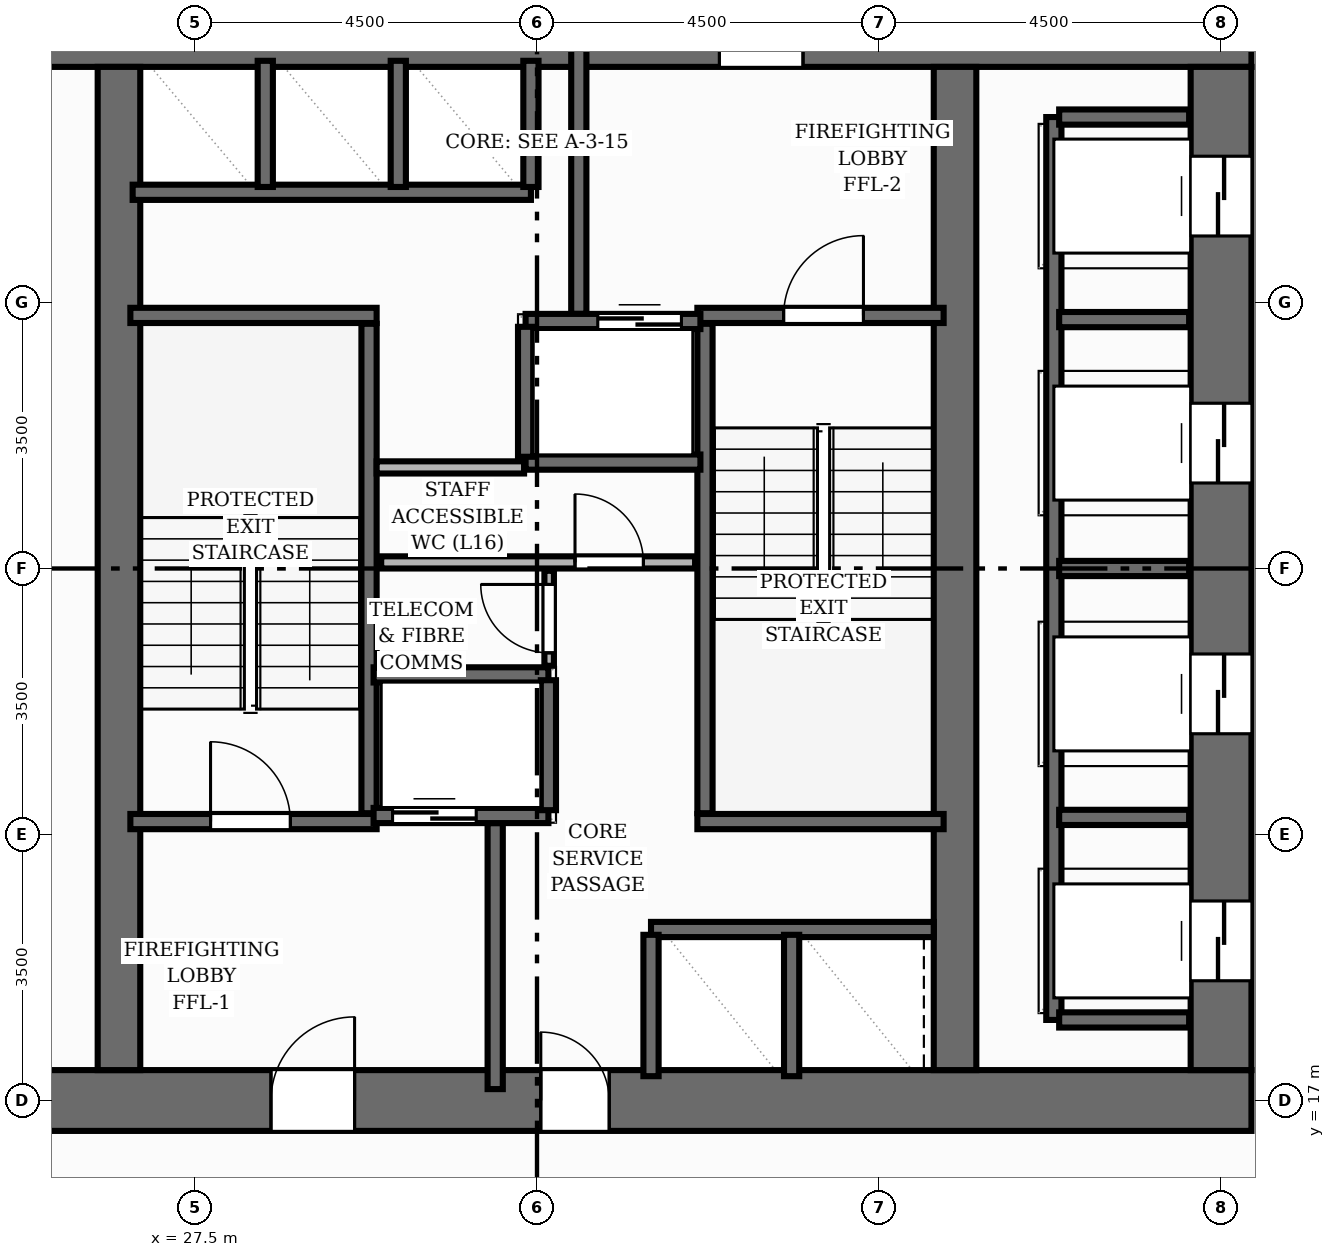
"""IFC4 building model, lengths in metres.
Left out: names, types, materials, properties, quantities, classifications, styles, units other than length and angle.
Written with IfcOpenShell. Run it as: python <this file> out.ifc"""

import sys

from ifc_helpers import new_model, si_unit, direction, frame, frame_2d, origin, place, context, subcontext, project, spatial, rectangle, extrude, element, fill, save


model = new_model("IFC4")
c1 = context("Model", 3, precision=1e-05, world=origin(), true_north=direction((0.0, 1.0)))
c2 = subcontext(c1, "Body", "Model", "MODEL_VIEW")
j1 = project(units=[si_unit("LENGTHUNIT", "METRE"), si_unit("PLANEANGLEUNIT", "RADIAN")], contexts=[c1])
p1 = place(None, origin())
s1 = spatial("IfcSite", under=j1, at=p1, CompositionType="ELEMENT")
p2 = place(p1, origin())
s2 = spatial("IfcBuilding", under=s1, at=p2, CompositionType="ELEMENT")
p3 = place(p2, frame((0.0, 0.0, 56.8)))
s3 = spatial("IfcBuildingStorey", under=s2, at=p3, CompositionType="ELEMENT", Elevation=56.8)
p4 = place(p3, frame((22.6, 17.0, 0.0), z_axis=(0.0, 0.0, 1.0), x_axis=(1.0, 0.0, 0.0)))
e1 = element("IfcWall", 1, at=p4, inside=s3, PredefinedType="SHEAR", context=c2, shape_type="SweptSolid", body=[
    extrude(rectangle(XDim=18.8, YDim=0.8, at=frame_2d((9.4, 0.0))), origin(), (0.0, 0.0, 1.0), 3.2),
])
p5 = place(p4, frame((5.9, 0.0, 0.0)))
e2 = element("IfcOpeningElement", 2, at=p5, cuts=e1, PredefinedType="OPENING", context=c2, shape_type="SweptSolid", body=[
    extrude(rectangle(XDim=1.1, YDim=2.15, at=frame_2d((0.55, 1.075))), frame((0.0, 0.41, 0.0), z_axis=(0.0, -1.0, 0.0), x_axis=(1.0, 0.0, 0.0)), (0.0, 0.0, 1.0), 0.82),
])
p6 = place(p4, frame((9.45, 0.0, 0.0)))
e3 = element("IfcOpeningElement", 3, at=p6, cuts=e1, PredefinedType="OPENING", context=c2, shape_type="SweptSolid", body=[
    extrude(rectangle(XDim=0.9, YDim=2.1, at=frame_2d((0.45, 1.05))), frame((0.0, 0.41, 0.0), z_axis=(0.0, -1.0, 0.0), x_axis=(1.0, 0.0, 0.0)), (0.0, 0.0, 1.0), 0.82),
])
p7 = place(p3, frame((22.6, 31.0, 0.0), z_axis=(0.0, 0.0, 1.0), x_axis=(1.0, 0.0, 0.0)))
e4 = element("IfcWall", 4, at=p7, inside=s3, PredefinedType="SHEAR", context=c2, shape_type="SweptSolid", body=[
    extrude(rectangle(XDim=18.8, YDim=0.8, at=frame_2d((9.4, 0.0))), origin(), (0.0, 0.0, 1.0), 3.2),
])
p8 = place(p7, frame((11.8, 0.0, 0.0)))
e5 = element("IfcOpeningElement", 5, at=p8, cuts=e4, PredefinedType="OPENING", context=c2, shape_type="SweptSolid", body=[
    extrude(rectangle(XDim=1.1, YDim=2.15, at=frame_2d((0.55, 1.075))), frame((0.0, 0.41, 0.0), z_axis=(0.0, -1.0, 0.0), x_axis=(1.0, 0.0, 0.0)), (0.0, 0.0, 1.0), 0.82),
])
p9 = place(p3, frame((41.0, 17.4, 0.0), z_axis=(0.0, 0.0, 1.0), x_axis=(0.0, 1.0, 0.0)))
e6 = element("IfcWall", 6, at=p9, inside=s3, PredefinedType="SHEAR", context=c2, shape_type="SweptSolid", body=[
    extrude(rectangle(XDim=13.2, YDim=0.8, at=frame_2d((6.6, 0.0))), origin(), (0.0, 0.0, 1.0), 3.2),
])
p10 = place(p9, frame((1.175, 0.0, 0.0)))
e7 = element("IfcOpeningElement", 7, at=p10, cuts=e6, PredefinedType="OPENING", context=c2, shape_type="SweptSolid", body=[
    extrude(rectangle(XDim=1.05, YDim=2.15, at=frame_2d((0.525, 1.075))), frame((0.0, 0.41, 0.0), z_axis=(0.0, -1.0, 0.0), x_axis=(1.0, 0.0, 0.0)), (0.0, 0.0, 1.0), 0.82),
])
p11 = place(p9, frame((4.425, 0.0, 0.0)))
e8 = element("IfcOpeningElement", 8, at=p11, cuts=e6, PredefinedType="OPENING", context=c2, shape_type="SweptSolid", body=[
    extrude(rectangle(XDim=1.05, YDim=2.15, at=frame_2d((0.525, 1.075))), frame((0.0, 0.41, 0.0), z_axis=(0.0, -1.0, 0.0), x_axis=(1.0, 0.0, 0.0)), (0.0, 0.0, 1.0), 0.82),
])
p12 = place(p9, frame((7.725, 0.0, 0.0)))
e9 = element("IfcOpeningElement", 9, at=p12, cuts=e6, PredefinedType="OPENING", context=c2, shape_type="SweptSolid", body=[
    extrude(rectangle(XDim=1.05, YDim=2.15, at=frame_2d((0.525, 1.075))), frame((0.0, 0.41, 0.0), z_axis=(0.0, -1.0, 0.0), x_axis=(1.0, 0.0, 0.0)), (0.0, 0.0, 1.0), 0.82),
])
p13 = place(p9, frame((10.975, 0.0, 0.0)))
e10 = element("IfcOpeningElement", 10, at=p13, cuts=e6, PredefinedType="OPENING", context=c2, shape_type="SweptSolid", body=[
    extrude(rectangle(XDim=1.05, YDim=2.15, at=frame_2d((0.525, 1.075))), frame((0.0, 0.41, 0.0), z_axis=(0.0, -1.0, 0.0), x_axis=(1.0, 0.0, 0.0)), (0.0, 0.0, 1.0), 0.82),
])
for number, where, z_axis, x_axis in (
    (11, (26.5, 17.4, 0.0), (0.0, 0.0, 1.0), (0.0, 1.0, 0.0)),
    (12, (37.5, 17.4, 0.0), (0.0, 0.0, 1.0), (0.0, 1.0, 0.0)),
):
    element("IfcWall", number, at=place(p3, frame(where, z_axis=z_axis, x_axis=x_axis)), inside=s3, PredefinedType="SHEAR", context=c2, shape_type="SweptSolid", body=[
        extrude(rectangle(XDim=13.2, YDim=0.56, at=frame_2d((6.6, 0.0))), origin(), (0.0, 0.0, 1.0), 3.2),
    ])
p14 = place(p3, frame((29.79, 20.78, 0.0), z_axis=(0.0, 0.0, 1.0), x_axis=(0.0, 1.0, 0.0)))
e13 = element("IfcWall", 13, at=p14, inside=s3, PredefinedType="SHEAR", context=c2, shape_type="SweptSolid", body=[
    extrude(rectangle(XDim=6.44, YDim=0.2, at=frame_2d((3.22, 0.0))), origin(), (0.0, 0.0, 1.0), 3.2),
])
p15 = place(p3, frame((26.65, 27.33, 0.0), z_axis=(0.0, 0.0, 1.0), x_axis=(1.0, 0.0, 0.0)))
e14 = element("IfcWall", 14, at=p15, inside=s3, PredefinedType="SHEAR", context=c2, shape_type="SweptSolid", body=[
    extrude(rectangle(XDim=3.24, YDim=0.2, at=frame_2d((1.62, 0.0))), origin(), (0.0, 0.0, 1.0), 3.2),
])
p16 = place(p3, frame((26.65, 20.67, 0.0), z_axis=(0.0, 0.0, 1.0), x_axis=(1.0, 0.0, 0.0)))
e15 = element("IfcWall", 15, at=p16, inside=s3, PredefinedType="SHEAR", context=c2, shape_type="SweptSolid", body=[
    extrude(rectangle(XDim=3.24, YDim=0.2, at=frame_2d((1.62, 0.0))), origin(), (0.0, 0.0, 1.0), 3.2),
])
p17 = place(p16, frame((1.055, 0.0, 0.0)))
e16 = element("IfcOpeningElement", 16, at=p17, cuts=e15, PredefinedType="OPENING", context=c2, shape_type="SweptSolid", body=[
    extrude(rectangle(XDim=1.05, YDim=2.15, at=frame_2d((0.525, 1.075))), frame((0.0, 0.11, 0.0), z_axis=(0.0, -1.0, 0.0), x_axis=(1.0, 0.0, 0.0)), (0.0, 0.0, 1.0), 0.22),
])
p18 = place(p3, frame((34.21, 20.78, 0.0), z_axis=(0.0, 0.0, 1.0), x_axis=(0.0, 1.0, 0.0)))
e17 = element("IfcWall", 17, at=p18, inside=s3, PredefinedType="SHEAR", context=c2, shape_type="SweptSolid", body=[
    extrude(rectangle(XDim=6.44, YDim=0.2, at=frame_2d((3.22, 0.0))), origin(), (0.0, 0.0, 1.0), 3.2),
])
p19 = place(p3, frame((34.11, 20.67, 0.0), z_axis=(0.0, 0.0, 1.0), x_axis=(1.0, 0.0, 0.0)))
e18 = element("IfcWall", 18, at=p19, inside=s3, PredefinedType="SHEAR", context=c2, shape_type="SweptSolid", body=[
    extrude(rectangle(XDim=3.24, YDim=0.2, at=frame_2d((1.62, 0.0))), origin(), (0.0, 0.0, 1.0), 3.2),
])
p20 = place(p3, frame((34.11, 27.33, 0.0), z_axis=(0.0, 0.0, 1.0), x_axis=(1.0, 0.0, 0.0)))
e19 = element("IfcWall", 19, at=p20, inside=s3, PredefinedType="SHEAR", context=c2, shape_type="SweptSolid", body=[
    extrude(rectangle(XDim=3.24, YDim=0.2, at=frame_2d((1.62, 0.0))), origin(), (0.0, 0.0, 1.0), 3.2),
])
p21 = place(p20, frame((1.135, 0.0, 0.0)))
e20 = element("IfcOpeningElement", 20, at=p21, cuts=e19, PredefinedType="OPENING", context=c2, shape_type="SweptSolid", body=[
    extrude(rectangle(XDim=1.05, YDim=2.15, at=frame_2d((0.525, 1.075))), frame((0.0, 0.11, 0.0), z_axis=(0.0, -1.0, 0.0), x_axis=(1.0, 0.0, 0.0)), (0.0, 0.0, 1.0), 0.22),
])
for number, where, z_axis, x_axis in (
    (21, (31.45, 17.15, 0.0), (0.0, 0.0, 1.0), (0.0, 1.0, 0.0)),
    (22, (32.55, 27.35, 0.0), (0.0, 0.0, 1.0), (0.0, 1.0, 0.0)),
):
    element("IfcWall", number, at=place(p3, frame(where, z_axis=z_axis, x_axis=x_axis)), inside=s3, PredefinedType="SHEAR", context=c2, shape_type="SweptSolid", body=[
        extrude(rectangle(XDim=3.5, YDim=0.2, at=frame_2d((1.75, 0.0))), origin(), (0.0, 0.0, 1.0), 3.2),
    ])
p22 = place(p3, frame((29.85, 20.75, 0.0), z_axis=(0.0, 0.0, 1.0), x_axis=(1.0, 0.0, 0.0)))
e23 = element("IfcWall", 23, at=p22, inside=s3, PredefinedType="SHEAR", context=c2, shape_type="SweptSolid", body=[
    extrude(rectangle(XDim=2.3, YDim=0.2, at=frame_2d((1.15, 0.0))), origin(), (0.0, 0.0, 1.0), 3.2),
])
p23 = place(p22, frame((0.25, 0.0, 0.0)))
e24 = element("IfcOpeningElement", 24, at=p23, cuts=e23, PredefinedType="OPENING", context=c2, shape_type="SweptSolid", body=[
    extrude(rectangle(XDim=1.1, YDim=2.15, at=frame_2d((0.55, 1.075))), frame((0.0, 0.11, 0.0), z_axis=(0.0, -1.0, 0.0), x_axis=(1.0, 0.0, 0.0)), (0.0, 0.0, 1.0), 0.22),
])
p24 = place(p3, frame((29.85, 22.6, 0.0), z_axis=(0.0, 0.0, 1.0), x_axis=(1.0, 0.0, 0.0)))
e25 = element("IfcWall", 25, at=p24, inside=s3, PredefinedType="SHEAR", context=c2, shape_type="SweptSolid", body=[
    extrude(rectangle(XDim=2.3, YDim=0.2, at=frame_2d((1.15, 0.0))), origin(), (0.0, 0.0, 1.0), 3.2),
])
p25 = place(p3, frame((32.15, 20.82, 0.0), z_axis=(0.0, 0.0, 1.0), x_axis=(0.0, 1.0, 0.0)))
e26 = element("IfcWall", 26, at=p25, inside=s3, PredefinedType="SHEAR", context=c2, shape_type="SweptSolid", body=[
    extrude(rectangle(XDim=1.71, YDim=0.2, at=frame_2d((0.855, 0.0))), origin(), (0.0, 0.0, 1.0), 3.2),
])
p26 = place(p3, frame((31.85, 27.25, 0.0), z_axis=(0.0, 0.0, 1.0), x_axis=(1.0, 0.0, 0.0)))
e27 = element("IfcWall", 27, at=p26, inside=s3, PredefinedType="SHEAR", context=c2, shape_type="SweptSolid", body=[
    extrude(rectangle(XDim=2.3, YDim=0.2, at=frame_2d((1.15, 0.0))), origin(), (0.0, 0.0, 1.0), 3.2),
])
p27 = place(p26, frame((0.95, 0.0, 0.0)))
e28 = element("IfcOpeningElement", 28, at=p27, cuts=e27, PredefinedType="OPENING", context=c2, shape_type="SweptSolid", body=[
    extrude(rectangle(XDim=1.1, YDim=2.15, at=frame_2d((0.55, 1.075))), frame((0.0, 0.11, 0.0), z_axis=(0.0, -1.0, 0.0), x_axis=(1.0, 0.0, 0.0)), (0.0, 0.0, 1.0), 0.22),
])
p28 = place(p3, frame((31.85, 25.4, 0.0), z_axis=(0.0, 0.0, 1.0), x_axis=(1.0, 0.0, 0.0)))
e29 = element("IfcWall", 29, at=p28, inside=s3, PredefinedType="SHEAR", context=c2, shape_type="SweptSolid", body=[
    extrude(rectangle(XDim=2.3, YDim=0.2, at=frame_2d((1.15, 0.0))), origin(), (0.0, 0.0, 1.0), 3.2),
])
p29 = place(p3, frame((31.85, 25.47, 0.0), z_axis=(0.0, 0.0, 1.0), x_axis=(0.0, 1.0, 0.0)))
e30 = element("IfcWall", 30, at=p29, inside=s3, PredefinedType="SHEAR", context=c2, shape_type="SweptSolid", body=[
    extrude(rectangle(XDim=1.71, YDim=0.2, at=frame_2d((0.855, 0.0))), origin(), (0.0, 0.0, 1.0), 3.2),
])
p30 = place(p3, frame((38.8, 18.06, 0.0), z_axis=(0.0, 0.0, 1.0), x_axis=(0.0, 1.0, 0.0)))
e31 = element("IfcWall", 31, at=p30, inside=s3, PredefinedType="SHEAR", context=c2, shape_type="SweptSolid", body=[
    extrude(rectangle(XDim=11.88, YDim=0.2, at=frame_2d((5.94, 0.0))), origin(), (0.0, 0.0, 1.0), 3.2),
])
for number, where, z_axis, x_axis in (
    (32, (38.87, 18.06, 0.0), (0.0, 0.0, 1.0), (1.0, 0.0, 0.0)),
    (33, (38.87, 29.94, 0.0), (0.0, 0.0, 1.0), (1.0, 0.0, 0.0)),
    (34, (38.87, 20.725, 0.0), (0.0, 0.0, 1.0), (1.0, 0.0, 0.0)),
    (35, (38.87, 24.0, 0.0), (0.0, 0.0, 1.0), (1.0, 0.0, 0.0)),
    (36, (38.87, 27.275, 0.0), (0.0, 0.0, 1.0), (1.0, 0.0, 0.0)),
):
    element("IfcWall", number, at=place(p3, frame(where, z_axis=z_axis, x_axis=x_axis)), inside=s3, PredefinedType="SHEAR", context=c2, shape_type="SweptSolid", body=[
        extrude(rectangle(XDim=1.71, YDim=0.2, at=frame_2d((0.855, 0.0))), origin(), (0.0, 0.0, 1.0), 3.2),
    ])
p31 = place(p3, frame((26.68, 28.95, 0.0), z_axis=(0.0, 0.0, 1.0), x_axis=(1.0, 0.0, 0.0)))
e37 = element("IfcWall", 37, at=p31, inside=s3, PredefinedType="SHEAR", context=c2, shape_type="SweptSolid", body=[
    extrude(rectangle(XDim=5.24, YDim=0.2, at=frame_2d((2.62, 0.0))), origin(), (0.0, 0.0, 1.0), 3.2),
])
for number, where, z_axis, x_axis in (
    (38, (31.92, 29.02, 0.0), (0.0, 0.0, 1.0), (0.0, 1.0, 0.0)),
    (39, (28.425, 29.02, 0.0), (0.0, 0.0, 1.0), (0.0, 1.0, 0.0)),
    (40, (30.175, 29.02, 0.0), (0.0, 0.0, 1.0), (0.0, 1.0, 0.0)),
):
    element("IfcWall", number, at=place(p3, frame(where, z_axis=z_axis, x_axis=x_axis)), inside=s3, PredefinedType="SHEAR", context=c2, shape_type="SweptSolid", body=[
        extrude(rectangle(XDim=1.66, YDim=0.2, at=frame_2d((0.83, 0.0))), origin(), (0.0, 0.0, 1.0), 3.2),
    ])
p32 = place(p3, frame((33.5, 19.25, 0.0), z_axis=(0.0, 0.0, 1.0), x_axis=(1.0, 0.0, 0.0)))
e41 = element("IfcWall", 41, at=p32, inside=s3, PredefinedType="SHEAR", context=c2, shape_type="SweptSolid", body=[
    extrude(rectangle(XDim=3.72, YDim=0.2, at=frame_2d((1.86, 0.0))), origin(), (0.0, 0.0, 1.0), 3.2),
])
for number, where, z_axis, x_axis in (
    (42, (33.5, 17.32, 0.0), (0.0, 0.0, 1.0), (0.0, 1.0, 0.0)),
    (43, (35.35, 17.32, 0.0), (0.0, 0.0, 1.0), (0.0, 1.0, 0.0)),
):
    element("IfcWall", number, at=place(p3, frame(where, z_axis=z_axis, x_axis=x_axis)), inside=s3, PredefinedType="SHEAR", context=c2, shape_type="SweptSolid", body=[
        extrude(rectangle(XDim=1.86, YDim=0.2, at=frame_2d((0.93, 0.0))), origin(), (0.0, 0.0, 1.0), 3.2),
    ])
p33 = place(p3, frame((29.95, 24.08, 0.0), z_axis=(0.0, 0.0, 1.0), x_axis=(1.0, 0.0, 0.0)))
e44 = element("IfcWall", 44, at=p33, inside=s3, PredefinedType="PLUMBINGWALL", context=c2, shape_type="SweptSolid", body=[
    extrude(rectangle(XDim=4.13, YDim=0.16, at=frame_2d((2.065, 0.0))), origin(), (0.0, 0.0, 1.0), 2.955),
])
p34 = place(p33, frame((2.55, 0.0, 0.0)))
e45 = element("IfcOpeningElement", 45, at=p34, cuts=e44, PredefinedType="OPENING", context=c2, shape_type="SweptSolid", body=[
    extrude(rectangle(XDim=0.9, YDim=2.1, at=frame_2d((0.45, 1.05))), frame((0.0, 0.09, 0.0), z_axis=(0.0, -1.0, 0.0), x_axis=(1.0, 0.0, 0.0)), (0.0, 0.0, 1.0), 0.18),
])
p35 = place(p3, frame((32.16, 22.72, 0.0), z_axis=(0.0, 0.0, 1.0), x_axis=(0.0, 1.0, 0.0)))
e46 = element("IfcWall", 46, at=p35, inside=s3, PredefinedType="PARTITIONING", context=c2, shape_type="SweptSolid", body=[
    extrude(rectangle(XDim=1.25, YDim=0.125, at=frame_2d((0.625, 0.0))), origin(), (0.0, 0.0, 1.0), 2.955),
])
p36 = place(p35, frame((0.17, 0.0, 0.0)))
e47 = element("IfcOpeningElement", 47, at=p36, cuts=e46, PredefinedType="OPENING", context=c2, shape_type="SweptSolid", body=[
    extrude(rectangle(XDim=0.9, YDim=2.1, at=frame_2d((0.45, 1.05))), frame((0.0, 0.073, 0.0), z_axis=(0.0, -1.0, 0.0), x_axis=(1.0, 0.0, 0.0)), (0.0, 0.0, 1.0), 0.145),
])
p37 = place(p3, frame((29.89, 25.33, 0.0), z_axis=(0.0, 0.0, 1.0), x_axis=(1.0, 0.0, 0.0)))
e48 = element("IfcWall", 48, at=p37, inside=s3, PredefinedType="PLUMBINGWALL", context=c2, shape_type="SweptSolid", body=[
    extrude(rectangle(XDim=1.94, YDim=0.16, at=frame_2d((0.97, 0.0))), origin(), (0.0, 0.0, 1.0), 2.955),
])
p38 = place(p3, frame((45.278, 16.459, 0.0), z_axis=(0.0, 0.0, 1.0), x_axis=(-0.810668637761, -0.585505217526, 0.0)))
e49 = element("IfcWall", 49, at=p38, inside=s3, PredefinedType="PARTITIONING", context=c2, shape_type="SweptSolid", body=[
    extrude(rectangle(XDim=11.55, YDim=0.125, at=frame_2d((5.775, 0.0))), origin(), (0.0, 0.0, 1.0), 2.955),
])
p39 = place(p38, frame((4.625, 0.0, 0.0)))
e50 = element("IfcOpeningElement", 50, at=p39, cuts=e49, PredefinedType="OPENING", context=c2, shape_type="SweptSolid", body=[
    extrude(rectangle(XDim=0.9, YDim=2.1, at=frame_2d((0.45, 1.05))), frame((0.0, 0.073, 0.0), z_axis=(0.0, -1.0, 0.0), x_axis=(1.0, 0.0, 0.0)), (0.0, 0.0, 1.0), 0.145),
])
p40 = place(p17, origin())
e51 = element("IfcDoor", 51, at=p40, inside=s3, OperationType="SINGLE_SWING_LEFT", PredefinedType="DOOR", context=c2, shape_type="SweptSolid", body=[
    extrude(rectangle(XDim=1.05, YDim=2.15, at=frame_2d((0.525, 1.075))), frame((0.0, 0.025, 0.0), z_axis=(0.0, -1.0, 0.0), x_axis=(1.0, 0.0, 0.0)), (0.0, 0.0, 1.0), 0.05),
])
fill(e16, e51)
p41 = place(p21, origin())
e52 = element("IfcDoor", 52, at=p41, inside=s3, OperationType="SINGLE_SWING_RIGHT", PredefinedType="DOOR", context=c2, shape_type="SweptSolid", body=[
    extrude(rectangle(XDim=1.05, YDim=2.15, at=frame_2d((0.525, 1.075))), frame((0.0, 0.025, 0.0), z_axis=(0.0, -1.0, 0.0), x_axis=(1.0, 0.0, 0.0)), (0.0, 0.0, 1.0), 0.05),
])
fill(e20, e52)
p42 = place(p5, origin())
e53 = element("IfcDoor", 53, at=p42, inside=s3, OperationType="SINGLE_SWING_RIGHT", PredefinedType="DOOR", context=c2, shape_type="SweptSolid", body=[
    extrude(rectangle(XDim=1.1, YDim=2.15, at=frame_2d((0.55, 1.075))), frame((0.0, 0.025, 0.0), z_axis=(0.0, -1.0, 0.0), x_axis=(1.0, 0.0, 0.0)), (0.0, 0.0, 1.0), 0.05),
])
fill(e2, e53)
p43 = place(p23, origin())
e54 = element("IfcDoor", 54, at=p43, inside=s3, OperationType="DOUBLE_DOOR_SLIDING", PredefinedType="DOOR", context=c2, shape_type="SweptSolid", body=[
    extrude(rectangle(XDim=1.1, YDim=2.15, at=frame_2d((0.55, 1.075))), frame((0.0, 0.025, 0.0), z_axis=(0.0, -1.0, 0.0), x_axis=(1.0, 0.0, 0.0)), (0.0, 0.0, 1.0), 0.05),
])
fill(e24, e54)
p44 = place(p27, origin())
e55 = element("IfcDoor", 55, at=p44, inside=s3, OperationType="DOUBLE_DOOR_SLIDING", PredefinedType="DOOR", context=c2, shape_type="SweptSolid", body=[
    extrude(rectangle(XDim=1.1, YDim=2.15, at=frame_2d((0.55, 1.075))), frame((0.0, 0.025, 0.0), z_axis=(0.0, -1.0, 0.0), x_axis=(1.0, 0.0, 0.0)), (0.0, 0.0, 1.0), 0.05),
])
fill(e28, e55)
p45 = place(p10, origin())
e56 = element("IfcDoor", 56, at=p45, inside=s3, OperationType="DOUBLE_DOOR_SLIDING", PredefinedType="DOOR", context=c2, shape_type="SweptSolid", body=[
    extrude(rectangle(XDim=1.05, YDim=2.15, at=frame_2d((0.525, 1.075))), frame((0.0, 0.025, 0.0), z_axis=(0.0, -1.0, 0.0), x_axis=(1.0, 0.0, 0.0)), (0.0, 0.0, 1.0), 0.05),
])
fill(e7, e56)
p46 = place(p11, origin())
e57 = element("IfcDoor", 57, at=p46, inside=s3, OperationType="DOUBLE_DOOR_SLIDING", PredefinedType="DOOR", context=c2, shape_type="SweptSolid", body=[
    extrude(rectangle(XDim=1.05, YDim=2.15, at=frame_2d((0.525, 1.075))), frame((0.0, 0.025, 0.0), z_axis=(0.0, -1.0, 0.0), x_axis=(1.0, 0.0, 0.0)), (0.0, 0.0, 1.0), 0.05),
])
fill(e8, e57)
p47 = place(p12, origin())
e58 = element("IfcDoor", 58, at=p47, inside=s3, OperationType="DOUBLE_DOOR_SLIDING", PredefinedType="DOOR", context=c2, shape_type="SweptSolid", body=[
    extrude(rectangle(XDim=1.05, YDim=2.15, at=frame_2d((0.525, 1.075))), frame((0.0, 0.025, 0.0), z_axis=(0.0, -1.0, 0.0), x_axis=(1.0, 0.0, 0.0)), (0.0, 0.0, 1.0), 0.05),
])
fill(e9, e58)
p48 = place(p13, origin())
e59 = element("IfcDoor", 59, at=p48, inside=s3, OperationType="DOUBLE_DOOR_SLIDING", PredefinedType="DOOR", context=c2, shape_type="SweptSolid", body=[
    extrude(rectangle(XDim=1.05, YDim=2.15, at=frame_2d((0.525, 1.075))), frame((0.0, 0.025, 0.0), z_axis=(0.0, -1.0, 0.0), x_axis=(1.0, 0.0, 0.0)), (0.0, 0.0, 1.0), 0.05),
])
fill(e10, e59)
p49 = place(p6, origin())
e60 = element("IfcDoor", 60, at=p49, inside=s3, OperationType="SINGLE_SWING_LEFT", PredefinedType="DOOR", context=c2, shape_type="SweptSolid", body=[
    extrude(rectangle(XDim=0.9, YDim=2.1, at=frame_2d((0.45, 1.05))), frame((0.0, 0.025, 0.0), z_axis=(0.0, -1.0, 0.0), x_axis=(1.0, 0.0, 0.0)), (0.0, 0.0, 1.0), 0.05),
])
fill(e3, e60)
p50 = place(p34, origin())
e61 = element("IfcDoor", 61, at=p50, inside=s3, OperationType="SINGLE_SWING_LEFT", PredefinedType="DOOR", context=c2, shape_type="SweptSolid", body=[
    extrude(rectangle(XDim=0.9, YDim=2.1, at=frame_2d((0.45, 1.05))), frame((0.0, 0.025, 0.0), z_axis=(0.0, -1.0, 0.0), x_axis=(1.0, 0.0, 0.0)), (0.0, 0.0, 1.0), 0.05),
])
fill(e45, e61)
p51 = place(p36, origin())
e62 = element("IfcDoor", 62, at=p51, inside=s3, OperationType="SINGLE_SWING_RIGHT", PredefinedType="DOOR", context=c2, shape_type="SweptSolid", body=[
    extrude(rectangle(XDim=0.9, YDim=2.1, at=frame_2d((0.45, 1.05))), frame((0.0, 0.025, 0.0), z_axis=(0.0, -1.0, 0.0), x_axis=(1.0, 0.0, 0.0)), (0.0, 0.0, 1.0), 0.05),
])
fill(e47, e62)
save(model, sys.argv[1])
